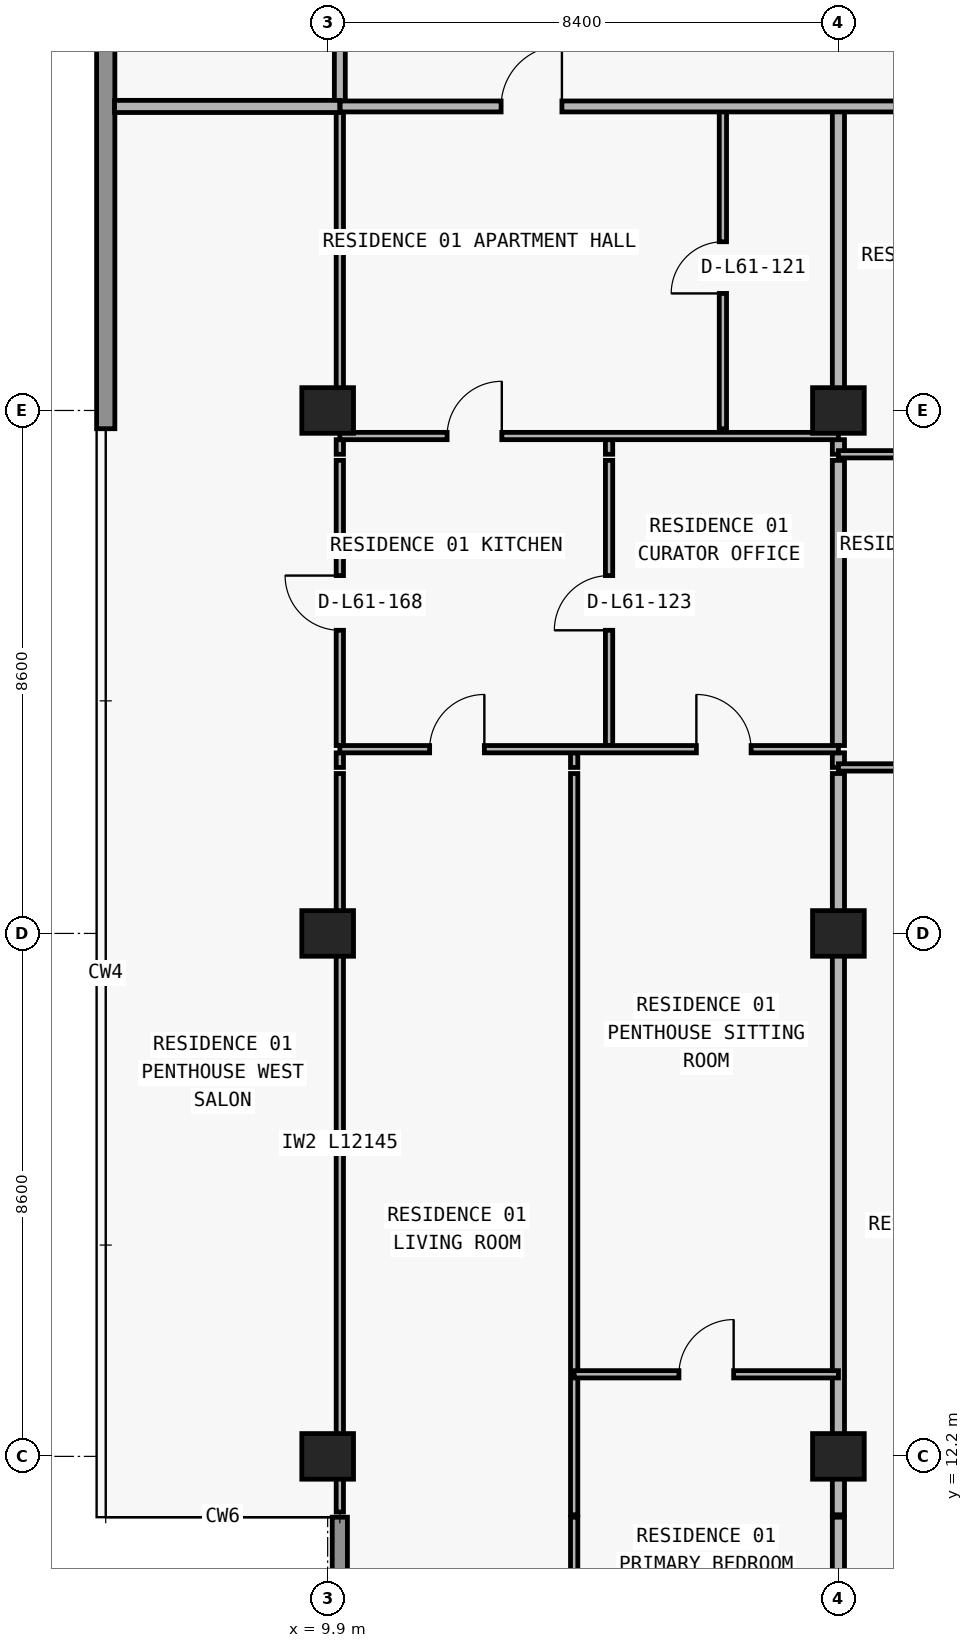
"""IFC4 building model, lengths in metres.
Left out: names, types, materials, properties, quantities, classifications, styles, units other than length and angle.
Written with IfcOpenShell. Run it as: python <this file> out.ifc"""

import sys

from ifc_helpers import new_model, si_unit, direction, frame, frame_2d, origin, origin_2d, place, context, subcontext, project, spatial, rectangle, extrude, element, fill, save


model = new_model("IFC4")
c1 = context("Model", 3, precision=1e-05, world=origin(), true_north=direction((0.0, 1.0)))
c2 = subcontext(c1, "Body", "Model", "MODEL_VIEW")
j1 = project(units=[si_unit("LENGTHUNIT", "METRE"), si_unit("PLANEANGLEUNIT", "RADIAN")], contexts=[c1])
p1 = place(None, origin())
s1 = spatial("IfcSite", under=j1, at=p1, CompositionType="ELEMENT")
p2 = place(p1, origin())
s2 = spatial("IfcBuilding", under=s1, at=p2, CompositionType="ELEMENT")
p3 = place(p2, frame((0.0, 0.0, 218.1)))
s3 = spatial("IfcBuildingStorey", under=s2, at=p3, CompositionType="ELEMENT", Elevation=218.1)
for number, where, z_axis, x_axis in (
    (1, (9.9, 12.2, 0.0), (0.0, 0.0, 1.0), (1.0, 0.0, 0.0)),
    (2, (18.3, 12.2, 0.0), (0.0, 0.0, 1.0), (1.0, 0.0, 0.0)),
    (3, (9.9, 20.8, 0.0), (0.0, 0.0, 1.0), (1.0, 0.0, 0.0)),
    (4, (18.3, 20.8, 0.0), (0.0, 0.0, 1.0), (1.0, 0.0, 0.0)),
    (5, (9.9, 29.4, 0.0), (0.0, 0.0, 1.0), (1.0, 0.0, 0.0)),
    (6, (18.3, 29.4, 0.0), (0.0, 0.0, 1.0), (1.0, 0.0, 0.0)),
):
    element("IfcColumn", number, at=place(p3, frame(where, z_axis=z_axis, x_axis=x_axis)), inside=s3, PredefinedType="COLUMN", context=c2, shape_type="SweptSolid", body=[
        extrude(rectangle(XDim=0.85, YDim=0.75, at=origin_2d()), origin(), (0.0, 0.0, 1.0), 3.0),
    ])
p4 = place(p3, frame((10.1, 11.2, 0.0), z_axis=(0.0, 0.0, 1.0), x_axis=(0.0, -1.0, 0.0)))
e7 = element("IfcWall", 7, at=p4, inside=s3, PredefinedType="ELEMENTEDWALL", context=c2, shape_type="SweptSolid", body=[
    extrude(rectangle(XDim=3.45, YDim=0.25, at=frame_2d((1.725, 0.0))), origin(), (0.0, 0.0, 1.0), 3.0),
])
p5 = place(p3, frame((6.25, 29.1, 0.0), z_axis=(0.0, 0.0, 1.0), x_axis=(0.0, 1.0, 0.0)))
e8 = element("IfcWall", 8, at=p5, inside=s3, PredefinedType="STANDARD", context=c2, shape_type="SweptSolid", body=[
    extrude(rectangle(XDim=17.9, YDim=0.3, at=frame_2d((8.95, 0.0))), origin(), (0.0, 0.0, 1.0), 3.0),
])
p6 = place(p3, frame((10.1, 11.285, 0.0), z_axis=(0.0, 0.0, 1.0), x_axis=(0.0, 1.0, 0.0)))
e9 = element("IfcWall", 9, at=p6, inside=s3, PredefinedType="PARTITIONING", context=c2, shape_type="SweptSolid", body=[
    extrude(rectangle(XDim=12.145, YDim=0.12, at=frame_2d((6.073, 0.0))), origin(), (0.0, 0.0, 1.0), 2.213),
])
p7 = place(p3, frame((10.1, 23.53, 0.0), z_axis=(0.0, 0.0, 1.0), x_axis=(0.0, 1.0, 0.0)))
e10 = element("IfcWall", 10, at=p7, inside=s3, PredefinedType="PARTITIONING", context=c2, shape_type="SweptSolid", body=[
    extrude(rectangle(XDim=0.24, YDim=0.12, at=frame_2d((0.12, 0.0))), origin(), (0.0, 0.0, 1.0), 2.213),
])
p8 = place(p3, frame((10.1, 23.89, 0.0), z_axis=(0.0, 0.0, 1.0), x_axis=(0.0, 1.0, 0.0)))
e11 = element("IfcWall", 11, at=p8, inside=s3, PredefinedType="PARTITIONING", context=c2, shape_type="SweptSolid", body=[
    extrude(rectangle(XDim=4.69, YDim=0.12, at=frame_2d((2.345, 0.0))), origin(), (0.0, 0.0, 1.0), 2.213),
])
p9 = place(p8, frame((1.895, 0.0, 0.0)))
e12 = element("IfcOpeningElement", 12, at=p9, cuts=e11, PredefinedType="OPENING", context=c2, shape_type="SweptSolid", body=[
    extrude(rectangle(XDim=0.9, YDim=2.15, at=frame_2d((0.45, 1.075))), frame((0.0, 0.07, 0.0), z_axis=(0.0, -1.0, 0.0), x_axis=(1.0, 0.0, 0.0)), (0.0, 0.0, 1.0), 0.14),
])
p10 = place(p3, frame((10.1, 28.68, 0.0), z_axis=(0.0, 0.0, 1.0), x_axis=(0.0, 1.0, 0.0)))
e13 = element("IfcWall", 13, at=p10, inside=s3, PredefinedType="PARTITIONING", context=c2, shape_type="SweptSolid", body=[
    extrude(rectangle(XDim=0.24, YDim=0.12, at=frame_2d((0.12, 0.0))), origin(), (0.0, 0.0, 1.0), 2.213),
])
p11 = place(p3, frame((10.1, 29.1, 0.0), z_axis=(0.0, 0.0, 1.0), x_axis=(0.0, 1.0, 0.0)))
e14 = element("IfcWall", 14, at=p11, inside=s3, PredefinedType="PARTITIONING", context=c2, shape_type="SweptSolid", body=[
    extrude(rectangle(XDim=5.3, YDim=0.12, at=frame_2d((2.65, 0.0))), origin(), (0.0, 0.0, 1.0), 2.213),
])
p12 = place(p3, frame((10.1, 34.405, 0.0), z_axis=(0.0, 0.0, 1.0), x_axis=(0.0, 1.0, 0.0)))
e15 = element("IfcWall", 15, at=p12, inside=s3, PredefinedType="PARTITIONING", context=c2, shape_type="SweptSolid", body=[
    extrude(rectangle(XDim=2.595, YDim=0.18, at=frame_2d((1.297, 0.0))), origin(), (0.0, 0.0, 1.0), 2.213),
])
p13 = place(p3, frame((13.954, 7.895, 0.0), z_axis=(0.0, 0.0, 1.0), x_axis=(0.0, 1.0, 0.0)))
e16 = element("IfcWall", 16, at=p13, inside=s3, PredefinedType="PARTITIONING", context=c2, shape_type="SweptSolid", body=[
    extrude(rectangle(XDim=3.305, YDim=0.12, at=frame_2d((1.652, 0.0))), origin(), (0.0, 0.0, 1.0), 3.0),
])
p14 = place(p3, frame((13.954, 11.24, 0.0), z_axis=(0.0, 0.0, 1.0), x_axis=(0.0, 1.0, 0.0)))
e17 = element("IfcWall", 17, at=p14, inside=s3, PredefinedType="PARTITIONING", context=c2, shape_type="SweptSolid", body=[
    extrude(rectangle(XDim=12.19, YDim=0.12, at=frame_2d((6.095, 0.0))), origin(), (0.0, 0.0, 1.0), 2.449),
])
p15 = place(p3, frame((13.954, 23.53, 0.0), z_axis=(0.0, 0.0, 1.0), x_axis=(0.0, 1.0, 0.0)))
e18 = element("IfcWall", 18, at=p15, inside=s3, PredefinedType="PARTITIONING", context=c2, shape_type="SweptSolid", body=[
    extrude(rectangle(XDim=0.24, YDim=0.12, at=frame_2d((0.12, 0.0))), origin(), (0.0, 0.0, 1.0), 2.449),
])
p16 = place(p3, frame((14.528, 23.89, 0.0), z_axis=(0.0, 0.0, 1.0), x_axis=(0.0, 1.0, 0.0)))
e19 = element("IfcWall", 19, at=p16, inside=s3, PredefinedType="PARTITIONING", context=c2, shape_type="SweptSolid", body=[
    extrude(rectangle(XDim=4.69, YDim=0.12, at=frame_2d((2.345, 0.0))), origin(), (0.0, 0.0, 1.0), 3.0),
])
p17 = place(p16, frame((1.895, 0.0, 0.0)))
e20 = element("IfcOpeningElement", 20, at=p17, cuts=e19, PredefinedType="OPENING", context=c2, shape_type="SweptSolid", body=[
    extrude(rectangle(XDim=0.9, YDim=2.15, at=frame_2d((0.45, 1.075))), frame((0.0, 0.07, 0.0), z_axis=(0.0, -1.0, 0.0), x_axis=(1.0, 0.0, 0.0)), (0.0, 0.0, 1.0), 0.14),
])
p18 = place(p3, frame((14.528, 28.68, 0.0), z_axis=(0.0, 0.0, 1.0), x_axis=(0.0, 1.0, 0.0)))
e21 = element("IfcWall", 21, at=p18, inside=s3, PredefinedType="PARTITIONING", context=c2, shape_type="SweptSolid", body=[
    extrude(rectangle(XDim=0.24, YDim=0.12, at=frame_2d((0.12, 0.0))), origin(), (0.0, 0.0, 1.0), 3.0),
])
p19 = place(p3, frame((16.4, 29.1, 0.0), z_axis=(0.0, 0.0, 1.0), x_axis=(0.0, 1.0, 0.0)))
e22 = element("IfcWall", 22, at=p19, inside=s3, PredefinedType="PARTITIONING", context=c2, shape_type="SweptSolid", body=[
    extrude(rectangle(XDim=5.3, YDim=0.12, at=frame_2d((2.65, 0.0))), origin(), (0.0, 0.0, 1.0), 2.675),
])
p20 = place(p19, frame((2.225, 0.0, 0.0)))
e23 = element("IfcOpeningElement", 23, at=p20, cuts=e22, PredefinedType="OPENING", context=c2, shape_type="SweptSolid", body=[
    extrude(rectangle(XDim=0.85, YDim=2.1, at=frame_2d((0.425, 1.05))), frame((0.0, 0.07, 0.0), z_axis=(0.0, -1.0, 0.0), x_axis=(1.0, 0.0, 0.0)), (0.0, 0.0, 1.0), 0.14),
])
p21 = place(p3, frame((18.3, 7.895, 0.0), z_axis=(0.0, 0.0, 1.0), x_axis=(0.0, 1.0, 0.0)))
e24 = element("IfcWall", 24, at=p21, inside=s3, PredefinedType="PARTITIONING", context=c2, shape_type="SweptSolid", body=[
    extrude(rectangle(XDim=3.305, YDim=0.2, at=frame_2d((1.652, 0.0))), origin(), (0.0, 0.0, 1.0), 3.0),
])
p22 = place(p3, frame((18.3, 11.24, 0.0), z_axis=(0.0, 0.0, 1.0), x_axis=(0.0, 1.0, 0.0)))
e25 = element("IfcWall", 25, at=p22, inside=s3, PredefinedType="PARTITIONING", context=c2, shape_type="SweptSolid", body=[
    extrude(rectangle(XDim=12.19, YDim=0.2, at=frame_2d((6.095, 0.0))), origin(), (0.0, 0.0, 1.0), 2.213),
])
p23 = place(p3, frame((18.3, 23.53, 0.0), z_axis=(0.0, 0.0, 1.0), x_axis=(0.0, 1.0, 0.0)))
e26 = element("IfcWall", 26, at=p23, inside=s3, PredefinedType="PARTITIONING", context=c2, shape_type="SweptSolid", body=[
    extrude(rectangle(XDim=0.24, YDim=0.2, at=frame_2d((0.12, 0.0))), origin(), (0.0, 0.0, 1.0), 2.213),
])
p24 = place(p3, frame((18.3, 23.89, 0.0), z_axis=(0.0, 0.0, 1.0), x_axis=(0.0, 1.0, 0.0)))
e27 = element("IfcWall", 27, at=p24, inside=s3, PredefinedType="PARTITIONING", context=c2, shape_type="SweptSolid", body=[
    extrude(rectangle(XDim=4.69, YDim=0.2, at=frame_2d((2.345, 0.0))), origin(), (0.0, 0.0, 1.0), 2.213),
])
p25 = place(p3, frame((18.3, 28.68, 0.0), z_axis=(0.0, 0.0, 1.0), x_axis=(0.0, 1.0, 0.0)))
e28 = element("IfcWall", 28, at=p25, inside=s3, PredefinedType="PARTITIONING", context=c2, shape_type="SweptSolid", body=[
    extrude(rectangle(XDim=0.24, YDim=0.2, at=frame_2d((0.12, 0.0))), origin(), (0.0, 0.0, 1.0), 2.213),
])
p26 = place(p3, frame((18.3, 29.1, 0.0), z_axis=(0.0, 0.0, 1.0), x_axis=(0.0, 1.0, 0.0)))
e29 = element("IfcWall", 29, at=p26, inside=s3, PredefinedType="PARTITIONING", context=c2, shape_type="SweptSolid", body=[
    extrude(rectangle(XDim=5.3, YDim=0.2, at=frame_2d((2.65, 0.0))), origin(), (0.0, 0.0, 1.0), 2.213),
])
p27 = place(p3, frame((13.954, 13.55, 0.0), z_axis=(0.0, 0.0, 1.0), x_axis=(1.0, 0.0, 0.0)))
e30 = element("IfcWall", 30, at=p27, inside=s3, PredefinedType="PARTITIONING", context=c2, shape_type="SweptSolid", body=[
    extrude(rectangle(XDim=4.346, YDim=0.12, at=frame_2d((2.173, 0.0))), origin(), (0.0, 0.0, 1.0), 3.0),
])
p28 = place(p27, frame((1.723, 0.0, 0.0)))
e31 = element("IfcOpeningElement", 31, at=p28, cuts=e30, PredefinedType="OPENING", context=c2, shape_type="SweptSolid", body=[
    extrude(rectangle(XDim=0.9, YDim=2.15, at=frame_2d((0.45, 1.075))), frame((0.0, 0.07, 0.0), z_axis=(0.0, -1.0, 0.0), x_axis=(1.0, 0.0, 0.0)), (0.0, 0.0, 1.0), 0.14),
])
p29 = place(p3, frame((18.3, 23.53, 0.0), z_axis=(0.0, 0.0, 1.0), x_axis=(1.0, 0.0, 0.0)))
e32 = element("IfcWall", 32, at=p29, inside=s3, PredefinedType="PARTITIONING", context=c2, shape_type="SweptSolid", body=[
    extrude(rectangle(XDim=8.18, YDim=0.12, at=frame_2d((4.09, 0.0))), origin(), (0.0, 0.0, 1.0), 3.0),
])
p30 = place(p29, frame((1.86, 0.0, 0.0)))
e33 = element("IfcOpeningElement", 33, at=p30, cuts=e32, PredefinedType="OPENING", context=c2, shape_type="SweptSolid", body=[
    extrude(rectangle(XDim=0.9, YDim=2.15, at=frame_2d((0.45, 1.075))), frame((0.0, 0.07, 0.0), z_axis=(0.0, -1.0, 0.0), x_axis=(1.0, 0.0, 0.0)), (0.0, 0.0, 1.0), 0.14),
])
p31 = place(p29, frame((6.033, 0.0, 0.0)))
e34 = element("IfcOpeningElement", 34, at=p31, cuts=e32, PredefinedType="OPENING", context=c2, shape_type="SweptSolid", body=[
    extrude(rectangle(XDim=0.9, YDim=2.15, at=frame_2d((0.45, 1.075))), frame((0.0, 0.07, 0.0), z_axis=(0.0, -1.0, 0.0), x_axis=(1.0, 0.0, 0.0)), (0.0, 0.0, 1.0), 0.14),
])
p32 = place(p3, frame((10.1, 23.83, 0.0), z_axis=(0.0, 0.0, 1.0), x_axis=(1.0, 0.0, 0.0)))
e35 = element("IfcWall", 35, at=p32, inside=s3, PredefinedType="PARTITIONING", context=c2, shape_type="SweptSolid", body=[
    extrude(rectangle(XDim=8.2, YDim=0.12, at=frame_2d((4.1, 0.0))), origin(), (0.0, 0.0, 1.0), 3.0),
])
p33 = place(p32, frame((1.477, 0.0, 0.0)))
e36 = element("IfcOpeningElement", 36, at=p33, cuts=e35, PredefinedType="OPENING", context=c2, shape_type="SweptSolid", body=[
    extrude(rectangle(XDim=0.9, YDim=2.15, at=frame_2d((0.45, 1.075))), frame((0.0, 0.07, 0.0), z_axis=(0.0, -1.0, 0.0), x_axis=(1.0, 0.0, 0.0)), (0.0, 0.0, 1.0), 0.14),
])
p34 = place(p32, frame((5.864, 0.0, 0.0)))
e37 = element("IfcOpeningElement", 37, at=p34, cuts=e35, PredefinedType="OPENING", context=c2, shape_type="SweptSolid", body=[
    extrude(rectangle(XDim=0.9, YDim=2.15, at=frame_2d((0.45, 1.075))), frame((0.0, 0.07, 0.0), z_axis=(0.0, -1.0, 0.0), x_axis=(1.0, 0.0, 0.0)), (0.0, 0.0, 1.0), 0.14),
])
p35 = place(p3, frame((18.3, 28.68, 0.0), z_axis=(0.0, 0.0, 1.0), x_axis=(1.0, 0.0, 0.0)))
e38 = element("IfcWall", 38, at=p35, inside=s3, PredefinedType="PARTITIONING", context=c2, shape_type="SweptSolid", body=[
    extrude(rectangle(XDim=8.18, YDim=0.12, at=frame_2d((4.09, 0.0))), origin(), (0.0, 0.0, 1.0), 3.0),
])
p36 = place(p35, frame((1.943, 0.0, 0.0)))
e39 = element("IfcOpeningElement", 39, at=p36, cuts=e38, PredefinedType="OPENING", context=c2, shape_type="SweptSolid", body=[
    extrude(rectangle(XDim=0.9, YDim=2.15, at=frame_2d((0.45, 1.075))), frame((0.0, 0.07, 0.0), z_axis=(0.0, -1.0, 0.0), x_axis=(1.0, 0.0, 0.0)), (0.0, 0.0, 1.0), 0.14),
])
p37 = place(p3, frame((10.1, 28.98, 0.0), z_axis=(0.0, 0.0, 1.0), x_axis=(1.0, 0.0, 0.0)))
e40 = element("IfcWall", 40, at=p37, inside=s3, PredefinedType="PARTITIONING", context=c2, shape_type="SweptSolid", body=[
    extrude(rectangle(XDim=8.2, YDim=0.12, at=frame_2d((4.1, 0.0))), origin(), (0.0, 0.0, 1.0), 3.0),
])
p38 = place(p37, frame((1.764, 0.0, 0.0)))
e41 = element("IfcOpeningElement", 41, at=p38, cuts=e40, PredefinedType="OPENING", context=c2, shape_type="SweptSolid", body=[
    extrude(rectangle(XDim=0.9, YDim=2.15, at=frame_2d((0.45, 1.075))), frame((0.0, 0.07, 0.0), z_axis=(0.0, -1.0, 0.0), x_axis=(1.0, 0.0, 0.0)), (0.0, 0.0, 1.0), 0.14),
])
p39 = place(p3, frame((6.395, 34.4, 0.0), z_axis=(0.0, 0.0, 1.0), x_axis=(1.0, 0.0, 0.0)))
e42 = element("IfcWall", 42, at=p39, inside=s3, PredefinedType="PARTITIONING", context=c2, shape_type="SweptSolid", body=[
    extrude(rectangle(XDim=3.705, YDim=0.2, at=frame_2d((1.853, 0.0))), origin(), (0.0, 0.0, 1.0), 3.0),
])
p40 = place(p3, frame((10.105, 34.4, 0.0), z_axis=(0.0, 0.0, 1.0), x_axis=(1.0, 0.0, 0.0)))
e43 = element("IfcWall", 43, at=p40, inside=s3, PredefinedType="PARTITIONING", context=c2, shape_type="SweptSolid", body=[
    extrude(rectangle(XDim=29.099, YDim=0.18, at=frame_2d((14.55, 0.0))), origin(), (0.0, 0.0, 1.0), 3.0),
])
p41 = place(p40, frame((2.647, 0.0, 0.0)))
e44 = element("IfcOpeningElement", 44, at=p41, cuts=e43, PredefinedType="OPENING", context=c2, shape_type="SweptSolid", body=[
    extrude(rectangle(XDim=1.0, YDim=2.2, at=frame_2d((0.5, 1.1))), frame((0.0, 0.1, 0.0), z_axis=(0.0, -1.0, 0.0), x_axis=(1.0, 0.0, 0.0)), (0.0, 0.0, 1.0), 0.2),
])
p42 = place(p40, frame((11.056, 0.0, 0.0)))
e45 = element("IfcOpeningElement", 45, at=p42, cuts=e43, PredefinedType="OPENING", context=c2, shape_type="SweptSolid", body=[
    extrude(rectangle(XDim=1.0, YDim=2.2, at=frame_2d((0.5, 1.1))), frame((0.0, 0.1, 0.0), z_axis=(0.0, -1.0, 0.0), x_axis=(1.0, 0.0, 0.0)), (0.0, 0.0, 1.0), 0.2),
])
p43 = place(p40, frame((19.334, 0.0, 0.0)))
e46 = element("IfcOpeningElement", 46, at=p43, cuts=e43, PredefinedType="OPENING", context=c2, shape_type="SweptSolid", body=[
    extrude(rectangle(XDim=1.0, YDim=2.2, at=frame_2d((0.5, 1.1))), frame((0.0, 0.1, 0.0), z_axis=(0.0, -1.0, 0.0), x_axis=(1.0, 0.0, 0.0)), (0.0, 0.0, 1.0), 0.2),
])
p44 = place(p40, frame((26.547, 0.0, 0.0)))
e47 = element("IfcOpeningElement", 47, at=p44, cuts=e43, PredefinedType="OPENING", context=c2, shape_type="SweptSolid", body=[
    extrude(rectangle(XDim=1.0, YDim=2.2, at=frame_2d((0.5, 1.1))), frame((0.0, 0.1, 0.0), z_axis=(0.0, -1.0, 0.0), x_axis=(1.0, 0.0, 0.0)), (0.0, 0.0, 1.0), 0.2),
])
p45 = place(p41, origin())
e48 = element("IfcDoor", 48, at=p45, inside=s3, OperationType="SINGLE_SWING_RIGHT", PredefinedType="DOOR", context=c2, shape_type="SweptSolid", body=[
    extrude(rectangle(XDim=1.0, YDim=2.2, at=frame_2d((0.5, 1.1))), frame((0.0, 0.025, 0.0), z_axis=(0.0, -1.0, 0.0), x_axis=(1.0, 0.0, 0.0)), (0.0, 0.0, 1.0), 0.05),
])
fill(e44, e48)
p46 = place(p20, origin())
e49 = element("IfcDoor", 49, at=p46, inside=s3, OperationType="SINGLE_SWING_LEFT", PredefinedType="DOOR", context=c2, shape_type="SweptSolid", body=[
    extrude(rectangle(XDim=0.85, YDim=2.1, at=frame_2d((0.425, 1.05))), frame((0.0, 0.025, 0.0), z_axis=(0.0, -1.0, 0.0), x_axis=(1.0, 0.0, 0.0)), (0.0, 0.0, 1.0), 0.05),
])
fill(e23, e49)
p47 = place(p38, origin())
e50 = element("IfcDoor", 50, at=p47, inside=s3, OperationType="SINGLE_SWING_RIGHT", PredefinedType="DOOR", context=c2, shape_type="SweptSolid", body=[
    extrude(rectangle(XDim=0.9, YDim=2.15, at=frame_2d((0.45, 1.075))), frame((0.0, 0.025, 0.0), z_axis=(0.0, -1.0, 0.0), x_axis=(1.0, 0.0, 0.0)), (0.0, 0.0, 1.0), 0.05),
])
fill(e41, e50)
p48 = place(p17, origin())
e51 = element("IfcDoor", 51, at=p48, inside=s3, OperationType="SINGLE_SWING_LEFT", PredefinedType="DOOR", context=c2, shape_type="SweptSolid", body=[
    extrude(rectangle(XDim=0.9, YDim=2.15, at=frame_2d((0.45, 1.075))), frame((0.0, 0.025, 0.0), z_axis=(0.0, -1.0, 0.0), x_axis=(1.0, 0.0, 0.0)), (0.0, 0.0, 1.0), 0.05),
])
fill(e20, e51)
p49 = place(p33, origin())
e52 = element("IfcDoor", 52, at=p49, inside=s3, OperationType="SINGLE_SWING_RIGHT", PredefinedType="DOOR", context=c2, shape_type="SweptSolid", body=[
    extrude(rectangle(XDim=0.9, YDim=2.15, at=frame_2d((0.45, 1.075))), frame((0.0, 0.025, 0.0), z_axis=(0.0, -1.0, 0.0), x_axis=(1.0, 0.0, 0.0)), (0.0, 0.0, 1.0), 0.05),
])
fill(e36, e52)
p50 = place(p34, origin())
e53 = element("IfcDoor", 53, at=p50, inside=s3, OperationType="SINGLE_SWING_LEFT", PredefinedType="DOOR", context=c2, shape_type="SweptSolid", body=[
    extrude(rectangle(XDim=0.9, YDim=2.15, at=frame_2d((0.45, 1.075))), frame((0.0, 0.025, 0.0), z_axis=(0.0, -1.0, 0.0), x_axis=(1.0, 0.0, 0.0)), (0.0, 0.0, 1.0), 0.05),
])
fill(e37, e53)
p51 = place(p28, origin())
e54 = element("IfcDoor", 54, at=p51, inside=s3, OperationType="SINGLE_SWING_RIGHT", PredefinedType="DOOR", context=c2, shape_type="SweptSolid", body=[
    extrude(rectangle(XDim=0.9, YDim=2.15, at=frame_2d((0.45, 1.075))), frame((0.0, 0.025, 0.0), z_axis=(0.0, -1.0, 0.0), x_axis=(1.0, 0.0, 0.0)), (0.0, 0.0, 1.0), 0.05),
])
fill(e31, e54)
p52 = place(p9, origin())
e55 = element("IfcDoor", 55, at=p52, inside=s3, OperationType="SINGLE_SWING_RIGHT", PredefinedType="DOOR", context=c2, shape_type="SweptSolid", body=[
    extrude(rectangle(XDim=0.9, YDim=2.15, at=frame_2d((0.45, 1.075))), frame((0.0, 0.025, 0.0), z_axis=(0.0, -1.0, 0.0), x_axis=(1.0, 0.0, 0.0)), (0.0, 0.0, 1.0), 0.05),
])
fill(e12, e55)
save(model, sys.argv[1])
